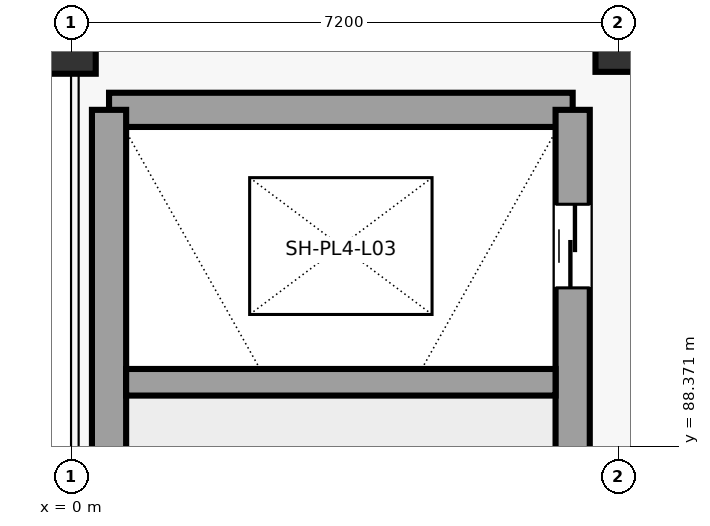
"""IFC4 building model, lengths in metres.
Left out: names, types, materials, properties, quantities, classifications, styles, units other than length and angle.
Written with IfcOpenShell. Run it as: python <this file> out.ifc"""

import sys

from ifc_helpers import new_model, si_unit, direction, frame, frame_2d, origin, origin_2d, place, context, subcontext, project, spatial, rectangle, extrude, element, fill, save


model = new_model("IFC4")
c1 = context("Model", 3, precision=1e-05, world=origin(), true_north=direction((0.0, 1.0)))
c2 = subcontext(c1, "Body", "Model", "MODEL_VIEW")
j1 = project(units=[si_unit("LENGTHUNIT", "METRE"), si_unit("PLANEANGLEUNIT", "RADIAN")], contexts=[c1])
p1 = place(None, origin())
s1 = spatial("IfcSite", under=j1, at=p1, CompositionType="ELEMENT")
p2 = place(p1, origin())
s2 = spatial("IfcBuilding", under=s1, at=p2, CompositionType="ELEMENT")
p3 = place(p2, frame((0.0, 0.0, 13.8)))
s3 = spatial("IfcBuildingStorey", under=s2, at=p3, CompositionType="ELEMENT", Elevation=13.8)
p4 = place(p3, frame((0.0, 93.6, 0.0), z_axis=(0.0, 0.0, 1.0), x_axis=(1.0, 0.0, 0.0)))
e1 = element("IfcColumn", 1, at=p4, inside=s3, PredefinedType="COLUMN", context=c2, shape_type="SweptSolid", body=[
    extrude(rectangle(XDim=0.65, YDim=0.65, at=origin_2d()), origin(), (0.0, 0.0, 1.0), 4.8),
])
p5 = place(p3, frame((7.2, 93.6, 0.0), z_axis=(0.0, 0.0, 1.0), x_axis=(1.0, 0.0, 0.0)))
e2 = element("IfcColumn", 2, at=p5, inside=s3, PredefinedType="COLUMN", context=c2, shape_type="SweptSolid", body=[
    extrude(rectangle(XDim=0.6, YDim=0.6, at=origin_2d()), origin(), (0.0, 0.0, 1.0), 4.8),
])
p6 = place(p3, frame((0.5, 92.8, 0.0), z_axis=(0.0, 0.0, 1.0), x_axis=(1.0, 0.0, 0.0)))
e3 = element("IfcWall", 3, at=p6, inside=s3, PredefinedType="SHEAR", context=c2, shape_type="SweptSolid", body=[
    extrude(rectangle(XDim=6.1, YDim=0.45, at=frame_2d((3.05, 0.0))), origin(), (0.0, 0.0, 1.0), 4.53),
])
p7 = place(p3, frame((0.5, 80.0, 0.0), z_axis=(0.0, 0.0, 1.0), x_axis=(0.0, 1.0, 0.0)))
e4 = element("IfcWall", 4, at=p7, inside=s3, PredefinedType="SHEAR", context=c2, shape_type="SweptSolid", body=[
    extrude(rectangle(XDim=12.8, YDim=0.45, at=frame_2d((6.4, 0.0))), origin(), (0.0, 0.0, 1.0), 4.53),
])
p8 = place(p3, frame((6.6, 80.0, 0.0), z_axis=(0.0, 0.0, 1.0), x_axis=(0.0, 1.0, 0.0)))
e5 = element("IfcWall", 5, at=p8, inside=s3, PredefinedType="SHEAR", context=c2, shape_type="SweptSolid", body=[
    extrude(rectangle(XDim=12.8, YDim=0.45, at=frame_2d((6.4, 0.0))), origin(), (0.0, 0.0, 1.0), 4.53),
])
p9 = place(p8, frame((0.55, 0.0, 0.0)))
e6 = element("IfcOpeningElement", 6, at=p9, cuts=e5, PredefinedType="OPENING", context=c2, shape_type="SweptSolid", body=[
    extrude(rectangle(XDim=1.2, YDim=2.25, at=frame_2d((0.6, 1.125))), frame((0.0, 0.235, 0.0), z_axis=(0.0, -1.0, 0.0), x_axis=(1.0, 0.0, 0.0)), (0.0, 0.0, 1.0), 0.47),
])
p10 = place(p8, frame((10.458, 0.0, 0.0)))
e7 = element("IfcOpeningElement", 7, at=p10, cuts=e5, PredefinedType="OPENING", context=c2, shape_type="SweptSolid", body=[
    extrude(rectangle(XDim=1.1, YDim=2.2, at=frame_2d((0.55, 1.1))), frame((0.0, 0.235, 0.0), z_axis=(0.0, -1.0, 0.0), x_axis=(1.0, 0.0, 0.0)), (0.0, 0.0, 1.0), 0.47),
])
p11 = place(p3, frame((0.725, 89.216, 0.0), z_axis=(0.0, 0.0, 1.0), x_axis=(1.0, 0.0, 0.0)))
e8 = element("IfcWall", 8, at=p11, inside=s3, PredefinedType="SHEAR", context=c2, shape_type="SweptSolid", body=[
    extrude(rectangle(XDim=5.65, YDim=0.35, at=frame_2d((2.825, 0.0))), origin(), (0.0, 0.0, 1.0), 4.53),
])
p12 = place(p10, origin())
e9 = element("IfcDoor", 9, at=p12, inside=s3, OperationType="SLIDING_TO_LEFT", PredefinedType="DOOR", context=c2, shape_type="SweptSolid", body=[
    extrude(rectangle(XDim=1.1, YDim=2.2, at=frame_2d((0.55, 1.1))), frame((0.0, 0.025, 0.0), z_axis=(0.0, -1.0, 0.0), x_axis=(1.0, 0.0, 0.0)), (0.0, 0.0, 1.0), 0.05),
])
fill(e7, e9)
save(model, sys.argv[1])
